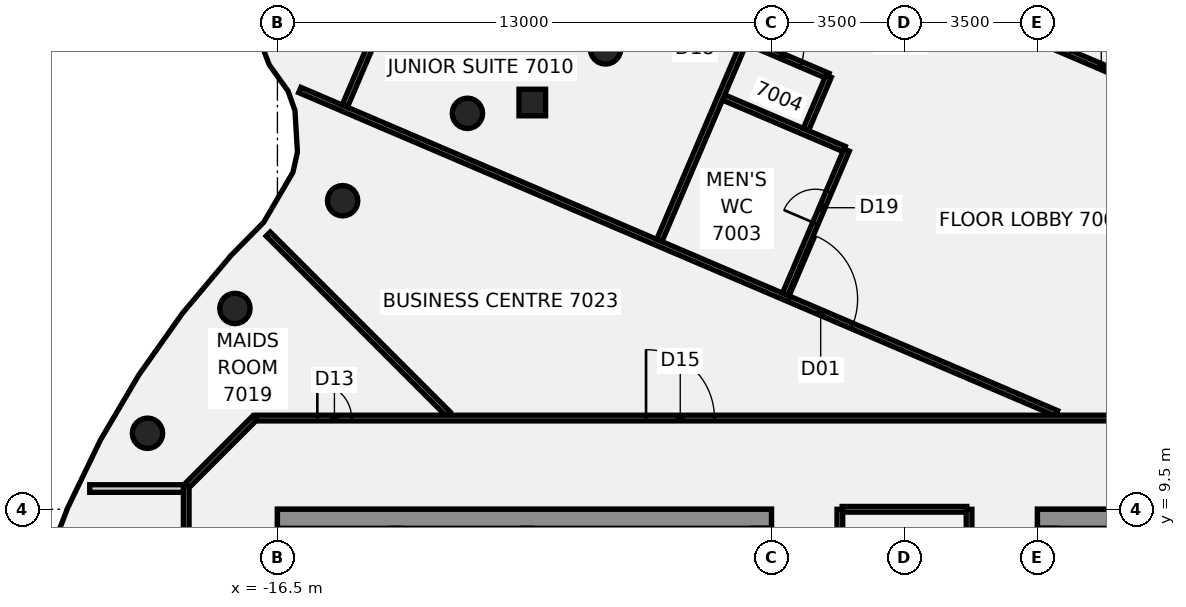
"""IFC4 building model, lengths in metres.
Left out: names, types, materials, properties, quantities, classifications, styles, units other than length and angle.
Written with IfcOpenShell. Run it as: python <this file> out.ifc"""

import sys

from ifc_helpers import new_model, si_unit, direction, frame, frame_2d, origin, origin_2d, place, context, subcontext, project, spatial, rectangle, circle, extrude, element, fill, save


model = new_model("IFC4")
c1 = context("Model", 3, precision=1e-05, world=origin(), true_north=direction((0.0, 1.0)))
c2 = subcontext(c1, "Body", "Model", "MODEL_VIEW")
j1 = project(units=[si_unit("LENGTHUNIT", "METRE"), si_unit("PLANEANGLEUNIT", "RADIAN")], contexts=[c1])
p1 = place(None, origin())
s1 = spatial("IfcSite", under=j1, at=p1, CompositionType="ELEMENT")
p2 = place(p1, origin())
s2 = spatial("IfcBuilding", under=s1, at=p2, CompositionType="ELEMENT")
p3 = place(p2, frame((0.0, 0.0, 274.8)))
s3 = spatial("IfcBuildingStorey", under=s2, at=p3, CompositionType="ELEMENT", Elevation=274.8)
for number, where, z_axis, x_axis in (
    (1, (-7.866, 21.613, -0.14), (0.0, 0.0, 1.0), (1.0, 0.0, 0.0)),
    (2, (-11.5, 19.919, -0.14), (0.0, 0.0, 1.0), (1.0, 0.0, 0.0)),
    (3, (-14.784, 17.619, -0.14), (0.0, 0.0, 1.0), (1.0, 0.0, 0.0)),
    (4, (-17.619, 14.784, -0.14), (0.0, 0.0, 1.0), (1.0, 0.0, 0.0)),
    (5, (-19.919, 11.5, -0.14), (0.0, 0.0, 1.0), (1.0, 0.0, 0.0)),
):
    element("IfcColumn", number, at=place(p3, frame(where, z_axis=z_axis, x_axis=x_axis)), inside=s3, PredefinedType="COLUMN", context=c2, shape_type="SweptSolid", body=[
        extrude(circle(Radius=0.4, at=origin_2d()), origin(), (0.0, 0.0, 1.0), 3.56),
    ])
p4 = place(p3, frame((-9.793, 20.203, -0.139), z_axis=(0.00968280735, -0.049993501778, 0.998702604894), x_axis=(0.392404503784, 0.918824615381, 0.042190420475)))
e6 = element("IfcColumn", 6, at=p4, inside=s3, PredefinedType="COLUMN", context=c2, shape_type="SweptSolid", body=[
    extrude(rectangle(XDim=0.7, YDim=0.7, at=origin_2d()), origin(), (0.0, 0.0, 1.0), 3.555),
])
p5 = place(p3, frame((-16.743, 16.743, 0.0), z_axis=(0.0, 0.0, 1.0), x_axis=(0.707106781187, -0.707106781187, 0.0)))
e7 = element("IfcWall", 7, at=p5, inside=s3, PredefinedType="PARTITIONING", context=c2, shape_type="SweptSolid", body=[
    extrude(rectangle(XDim=6.694, YDim=0.15, at=frame_2d((3.347, 0.0))), origin(), (0.0, 0.0, 1.0), 2.824),
])
p6 = place(p3, frame((-15.911, 20.533, 0.0), z_axis=(0.0, 0.0, 1.0), x_axis=(0.919595802133, -0.392865830405, 0.0)))
e8 = element("IfcWall", 8, at=p6, inside=s3, PredefinedType="PARTITIONING", context=c2, shape_type="SweptSolid", body=[
    extrude(rectangle(XDim=21.654, YDim=0.15, at=frame_2d((10.827, 0.0))), origin(), (0.0, 0.0, 1.0), 2.824),
])
p7 = place(p6, frame((14.005, 0.0, 0.0)))
e9 = element("IfcOpeningElement", 9, at=p7, cuts=e8, PredefinedType="OPENING", context=c2, shape_type="SweptSolid", body=[
    extrude(rectangle(XDim=1.8, YDim=2.1, at=frame_2d((0.9, 1.05))), frame((0.0, 0.085, 0.0), z_axis=(0.0, -1.0, 0.0), x_axis=(1.0, 0.0, 0.0)), (0.0, 0.0, 1.0), 0.17),
])
p8 = place(p3, frame((-4.761, 20.336, 0.0), z_axis=(0.0, 0.0, 1.0), x_axis=(0.91960570613, -0.392842646938, 0.0)))
e10 = element("IfcWall", 10, at=p8, inside=s3, PredefinedType="PARTITIONING", context=c2, shape_type="SweptSolid", body=[
    extrude(rectangle(XDim=3.449, YDim=0.15, at=frame_2d((1.725, 0.0))), origin(), (0.0, 0.0, 1.0), 2.824),
])
p9 = place(p3, frame((-4.128, 21.807, 0.0), z_axis=(0.0, 0.0, 1.0), x_axis=(0.919556307153, -0.392958264929, 0.0)))
e11 = element("IfcWall", 11, at=p9, inside=s3, PredefinedType="PARTITIONING", context=c2, shape_type="SweptSolid", body=[
    extrude(rectangle(XDim=2.3, YDim=0.15, at=frame_2d((1.15, 0.0))), origin(), (0.0, 0.0, 1.0), 2.824),
])
p10 = place(p9, frame((0.52, 0.0, 0.0)))
e12 = element("IfcOpeningElement", 12, at=p10, cuts=e11, PredefinedType="OPENING", context=c2, shape_type="SweptSolid", body=[
    extrude(rectangle(XDim=1.0, YDim=2.1, at=frame_2d((0.5, 1.05))), frame((0.0, 0.085, 0.0), z_axis=(0.0, -1.0, 0.0), x_axis=(1.0, 0.0, 0.0)), (0.0, 0.0, 1.0), 0.17),
])
p11 = place(p3, frame((0.351, 23.209, 0.0), z_axis=(0.0, 0.0, 1.0), x_axis=(0.919588500122, -0.392882922056, 0.0)))
e13 = element("IfcWall", 13, at=p11, inside=s3, PredefinedType="PARTITIONING", context=c2, shape_type="SweptSolid", body=[
    extrude(rectangle(XDim=14.077, YDim=0.15, at=frame_2d((7.038, 0.0))), origin(), (0.0, 0.0, 1.0), 2.824),
])
p12 = place(p11, frame((4.35, 0.0, 0.0)))
e14 = element("IfcOpeningElement", 14, at=p12, cuts=e13, PredefinedType="OPENING", context=c2, shape_type="SweptSolid", body=[
    extrude(rectangle(XDim=1.8, YDim=2.1, at=frame_2d((0.9, 1.05))), frame((0.0, 0.085, 0.0), z_axis=(0.0, -1.0, 0.0), x_axis=(1.0, 0.0, 0.0)), (0.0, 0.0, 1.0), 0.17),
])
p13 = place(p3, frame((-21.439, 10.046, 0.0), z_axis=(0.0, 0.0, 1.0), x_axis=(1.0, 0.0, 0.0)))
e15 = element("IfcWall", 15, at=p13, inside=s3, PredefinedType="PARTITIONING", context=c2, shape_type="SweptSolid", body=[
    extrude(rectangle(XDim=2.484, YDim=0.2, at=frame_2d((1.242, 0.0))), origin(), (0.0, 0.0, 1.0), 2.824),
])
p14 = place(p3, frame((-17.065, 11.9, 0.0), z_axis=(0.0, 0.0, 1.0), x_axis=(1.0, 0.0, 0.0)))
e16 = element("IfcWall", 16, at=p14, inside=s3, PredefinedType="PARTITIONING", context=c2, shape_type="SweptSolid", body=[
    extrude(rectangle(XDim=34.165, YDim=0.15, at=frame_2d((17.083, 0.0))), origin(), (0.0, 0.0, 1.0), 2.824),
])
p15 = place(p14, frame((23.761, 0.0, 0.0)))
e17 = element("IfcOpeningElement", 17, at=p15, cuts=e16, PredefinedType="OPENING", context=c2, shape_type="SweptSolid", body=[
    extrude(rectangle(XDim=1.8, YDim=2.1, at=frame_2d((0.9, 1.05))), frame((0.0, 0.085, 0.0), z_axis=(0.0, -1.0, 0.0), x_axis=(1.0, 0.0, 0.0)), (0.0, 0.0, 1.0), 0.17),
])
p16 = place(p14, frame((1.615, 0.0, 0.0)))
e18 = element("IfcOpeningElement", 18, at=p16, cuts=e16, PredefinedType="OPENING", context=c2, shape_type="SweptSolid", body=[
    extrude(rectangle(XDim=0.9, YDim=2.1, at=frame_2d((0.45, 1.05))), frame((0.0, 0.085, 0.0), z_axis=(0.0, -1.0, 0.0), x_axis=(1.0, 0.0, 0.0)), (0.0, 0.0, 1.0), 0.17),
])
p17 = place(p14, frame((31.665, 0.0, 0.0)))
e19 = element("IfcOpeningElement", 19, at=p17, cuts=e16, PredefinedType="OPENING", context=c2, shape_type="SweptSolid", body=[
    extrude(rectangle(XDim=0.9, YDim=2.1, at=frame_2d((0.45, 1.05))), frame((0.0, 0.085, 0.0), z_axis=(0.0, -1.0, 0.0), x_axis=(1.0, 0.0, 0.0)), (0.0, 0.0, 1.0), 0.17),
])
p18 = place(p14, frame((10.265, 0.0, 0.0)))
e20 = element("IfcOpeningElement", 20, at=p18, cuts=e16, PredefinedType="OPENING", context=c2, shape_type="SweptSolid", body=[
    extrude(rectangle(XDim=1.8, YDim=2.1, at=frame_2d((0.9, 1.05))), frame((0.0, 0.085, 0.0), z_axis=(0.0, -1.0, 0.0), x_axis=(1.0, 0.0, 0.0)), (0.0, 0.0, 1.0), 0.17),
])
p19 = place(p3, frame((-1.64, 9.5, 0.0), z_axis=(0.0, 0.0, 1.0), x_axis=(1.0, 0.0, 0.0)))
e21 = element("IfcWall", 21, at=p19, inside=s3, PredefinedType="PARTITIONING", context=c2, shape_type="SweptSolid", body=[
    extrude(rectangle(XDim=3.28, YDim=0.15, at=frame_2d((1.64, 0.0))), origin(), (0.0, 0.0, 1.0), 2.824),
])
p20 = place(p3, frame((-18.886, 10.114, 0.0), z_axis=(0.0, 0.0, 1.0), x_axis=(0.707106781187, 0.707106781187, 0.0)))
e22 = element("IfcWall", 22, at=p20, inside=s3, PredefinedType="PARTITIONING", context=c2, shape_type="SweptSolid", body=[
    extrude(rectangle(XDim=2.526, YDim=0.15, at=frame_2d((1.263, 0.0))), origin(), (0.0, 0.0, 1.0), 2.824),
])
p21 = place(p3, frame((-14.728, 20.109, 0.0), z_axis=(0.0, 0.0, 1.0), x_axis=(0.392937170338, 0.919565321316, 0.0)))
e23 = element("IfcWall", 23, at=p21, inside=s3, PredefinedType="PARTITIONING", context=c2, shape_type="SweptSolid", body=[
    extrude(rectangle(XDim=14.224, YDim=0.15, at=frame_2d((7.112, 0.0))), origin(), (0.0, 0.0, 1.0), 2.824),
])
p22 = place(p21, frame((10.525, 0.0, 0.0)))
e24 = element("IfcOpeningElement", 24, at=p22, cuts=e23, PredefinedType="OPENING", context=c2, shape_type="SweptSolid", body=[
    extrude(rectangle(XDim=1.8, YDim=2.1, at=frame_2d((0.9, 1.05))), frame((0.0, 0.085, 0.0), z_axis=(0.0, -1.0, 0.0), x_axis=(1.0, 0.0, 0.0)), (0.0, 0.0, 1.0), 0.17),
])
p23 = place(p3, frame((-6.45, 16.573, 0.0), z_axis=(0.0, 0.0, 1.0), x_axis=(0.392889649243, 0.919585625985, 0.0)))
e25 = element("IfcWall", 25, at=p23, inside=s3, PredefinedType="PARTITIONING", context=c2, shape_type="SweptSolid", body=[
    extrude(rectangle(XDim=6.326, YDim=0.15, at=frame_2d((3.163, 0.0))), origin(), (0.0, 0.0, 1.0), 2.824),
])
p24 = place(p3, frame((-3.14, 15.159, 0.0), z_axis=(0.0, 0.0, 1.0), x_axis=(0.392854606295, 0.919600597168, 0.0)))
e26 = element("IfcWall", 26, at=p24, inside=s3, PredefinedType="PARTITIONING", context=c2, shape_type="SweptSolid", body=[
    extrude(rectangle(XDim=4.125, YDim=0.15, at=frame_2d((2.062, 0.0))), origin(), (0.0, 0.0, 1.0), 2.824),
])
p25 = place(p24, frame((2.025, 0.0, 0.0)))
e27 = element("IfcOpeningElement", 27, at=p25, cuts=e26, PredefinedType="OPENING", context=c2, shape_type="SweptSolid", body=[
    extrude(rectangle(XDim=0.9, YDim=2.1, at=frame_2d((0.45, 1.05))), frame((0.0, 0.085, 0.0), z_axis=(0.0, -1.0, 0.0), x_axis=(1.0, 0.0, 0.0)), (0.0, 0.0, 1.0), 0.17),
])
p26 = place(p3, frame((-2.592, 19.497, 0.0), z_axis=(0.0, 0.0, 1.0), x_axis=(0.39231007283, 0.919833031999, 0.0)))
e28 = element("IfcWall", 28, at=p26, inside=s3, PredefinedType="PARTITIONING", context=c2, shape_type="SweptSolid", body=[
    extrude(rectangle(XDim=1.52, YDim=0.15, at=frame_2d((0.76, 0.0))), origin(), (0.0, 0.0, 1.0), 2.824),
])
p27 = place(p3, frame((-18.9, -10.1, 0.0), z_axis=(0.0, 0.0, 1.0), x_axis=(0.0, 1.0, 0.0)))
e29 = element("IfcWall", 29, at=p27, inside=s3, PredefinedType="PARTITIONING", context=c2, shape_type="SweptSolid", body=[
    extrude(rectangle(XDim=20.2, YDim=0.15, at=frame_2d((10.1, 0.0))), origin(), (0.0, 0.0, 1.0), 2.824),
])
p28 = place(p27, frame((2.7, 0.0, 0.0)))
e30 = element("IfcOpeningElement", 30, at=p28, cuts=e29, PredefinedType="OPENING", context=c2, shape_type="SweptSolid", body=[
    extrude(rectangle(XDim=0.9, YDim=2.1, at=frame_2d((0.45, 1.05))), frame((0.0, 0.085, 0.0), z_axis=(0.0, -1.0, 0.0), x_axis=(1.0, 0.0, 0.0)), (0.0, 0.0, 1.0), 0.17),
])
p29 = place(p27, frame((15.327, 0.0, 0.0)))
e31 = element("IfcOpeningElement", 31, at=p29, cuts=e29, PredefinedType="OPENING", context=c2, shape_type="SweptSolid", body=[
    extrude(rectangle(XDim=0.9, YDim=2.1, at=frame_2d((0.45, 1.05))), frame((0.0, 0.085, 0.0), z_axis=(0.0, -1.0, 0.0), x_axis=(1.0, 0.0, 0.0)), (0.0, 0.0, 1.0), 0.17),
])
p30 = place(p3, frame((-1.7, -9.5, 0.0), z_axis=(0.0, 0.0, 1.0), x_axis=(0.0, 1.0, 0.0)))
e32 = element("IfcWall", 32, at=p30, inside=s3, PredefinedType="PARTITIONING", context=c2, shape_type="SweptSolid", body=[
    extrude(rectangle(XDim=19.0, YDim=0.15, at=frame_2d((9.5, 0.0))), origin(), (0.0, 0.0, 1.0), 2.824),
])
p31 = place(p30, frame((4.35, 0.0, 0.0)))
e33 = element("IfcOpeningElement", 33, at=p31, cuts=e32, PredefinedType="OPENING", context=c2, shape_type="SweptSolid", body=[
    extrude(rectangle(XDim=1.8, YDim=2.1, at=frame_2d((0.9, 1.05))), frame((0.0, 0.085, 0.0), z_axis=(0.0, -1.0, 0.0), x_axis=(1.0, 0.0, 0.0)), (0.0, 0.0, 1.0), 0.17),
])
p32 = place(p30, frame((11.5, 0.0, 0.0)))
e34 = element("IfcOpeningElement", 34, at=p32, cuts=e32, PredefinedType="OPENING", context=c2, shape_type="SweptSolid", body=[
    extrude(rectangle(XDim=1.8, YDim=2.1, at=frame_2d((0.9, 1.05))), frame((0.0, 0.085, 0.0), z_axis=(0.0, -1.0, 0.0), x_axis=(1.0, 0.0, 0.0)), (0.0, 0.0, 1.0), 0.17),
])
p33 = place(p3, frame((1.7, -9.5, 0.0), z_axis=(0.0, 0.0, 1.0), x_axis=(0.0, 1.0, 0.0)))
e35 = element("IfcWall", 35, at=p33, inside=s3, PredefinedType="PARTITIONING", context=c2, shape_type="SweptSolid", body=[
    extrude(rectangle(XDim=19.0, YDim=0.15, at=frame_2d((9.5, 0.0))), origin(), (0.0, 0.0, 1.0), 2.824),
])
for number, where, z_axis, x_axis in (
    (36, (-16.5, 9.25, 0.0), (0.0, 0.0, 1.0), (1.0, 0.0, 0.0)),
    (37, (16.5, 9.25, 0.0), (0.0, 0.0, 1.0), (-1.0, 0.0, 0.0)),
):
    element("IfcWall", number, at=place(p3, frame(where, z_axis=z_axis, x_axis=x_axis)), inside=s3, PredefinedType="SHEAR", context=c2, shape_type="SweptSolid", body=[
        extrude(rectangle(XDim=13.0, YDim=0.5, at=frame_2d((6.5, 0.0))), origin(), (0.0, 0.0, 1.0), 3.42),
    ])
p34 = place(p7, origin())
e38 = element("IfcDoor", 38, at=p34, inside=s3, OperationType="DOUBLE_DOOR_SINGLE_SWING", PredefinedType="DOOR", context=c2, shape_type="SweptSolid", body=[
    extrude(rectangle(XDim=1.8, YDim=2.1, at=frame_2d((0.9, 1.05))), frame((0.0, 0.025, 0.0), z_axis=(0.0, -1.0, 0.0), x_axis=(1.0, 0.0, 0.0)), (0.0, 0.0, 1.0), 0.05),
])
fill(e9, e38)
p35 = place(p10, frame((1.0, 0.0, 0.0), z_axis=(0.0, 0.0, 1.0), x_axis=(-1.0, 0.0, 0.0)))
e39 = element("IfcDoor", 39, at=p35, inside=s3, OperationType="SINGLE_SWING_LEFT", PredefinedType="DOOR", context=c2, shape_type="SweptSolid", body=[
    extrude(rectangle(XDim=1.0, YDim=2.1, at=frame_2d((0.5, 1.05))), frame((0.0, 0.025, 0.0), z_axis=(0.0, -1.0, 0.0), x_axis=(1.0, 0.0, 0.0)), (0.0, 0.0, 1.0), 0.05),
])
fill(e12, e39)
p36 = place(p12, origin())
e40 = element("IfcDoor", 40, at=p36, inside=s3, OperationType="DOUBLE_DOOR_SINGLE_SWING", PredefinedType="DOOR", context=c2, shape_type="SweptSolid", body=[
    extrude(rectangle(XDim=1.8, YDim=2.1, at=frame_2d((0.9, 1.05))), frame((0.0, 0.025, 0.0), z_axis=(0.0, -1.0, 0.0), x_axis=(1.0, 0.0, 0.0)), (0.0, 0.0, 1.0), 0.05),
])
fill(e14, e40)
p37 = place(p16, origin())
e41 = element("IfcDoor", 41, at=p37, inside=s3, OperationType="SINGLE_SWING_RIGHT", PredefinedType="DOOR", context=c2, shape_type="SweptSolid", body=[
    extrude(rectangle(XDim=0.9, YDim=2.1, at=frame_2d((0.45, 1.05))), frame((0.0, 0.025, 0.0), z_axis=(0.0, -1.0, 0.0), x_axis=(1.0, 0.0, 0.0)), (0.0, 0.0, 1.0), 0.05),
])
fill(e18, e41)
p38 = place(p18, frame((1.8, 0.0, 0.0), z_axis=(0.0, 0.0, 1.0), x_axis=(-1.0, 0.0, 0.0)))
e42 = element("IfcDoor", 42, at=p38, inside=s3, OperationType="DOUBLE_DOOR_SINGLE_SWING", PredefinedType="DOOR", context=c2, shape_type="SweptSolid", body=[
    extrude(rectangle(XDim=1.8, YDim=2.1, at=frame_2d((0.9, 1.05))), frame((0.0, 0.025, 0.0), z_axis=(0.0, -1.0, 0.0), x_axis=(1.0, 0.0, 0.0)), (0.0, 0.0, 1.0), 0.05),
])
fill(e20, e42)
p39 = place(p25, origin())
e43 = element("IfcDoor", 43, at=p39, inside=s3, OperationType="SINGLE_SWING_LEFT", PredefinedType="DOOR", context=c2, shape_type="SweptSolid", body=[
    extrude(rectangle(XDim=0.9, YDim=2.1, at=frame_2d((0.45, 1.05))), frame((0.0, 0.025, 0.0), z_axis=(0.0, -1.0, 0.0), x_axis=(1.0, 0.0, 0.0)), (0.0, 0.0, 1.0), 0.05),
])
fill(e27, e43)
save(model, sys.argv[1])
